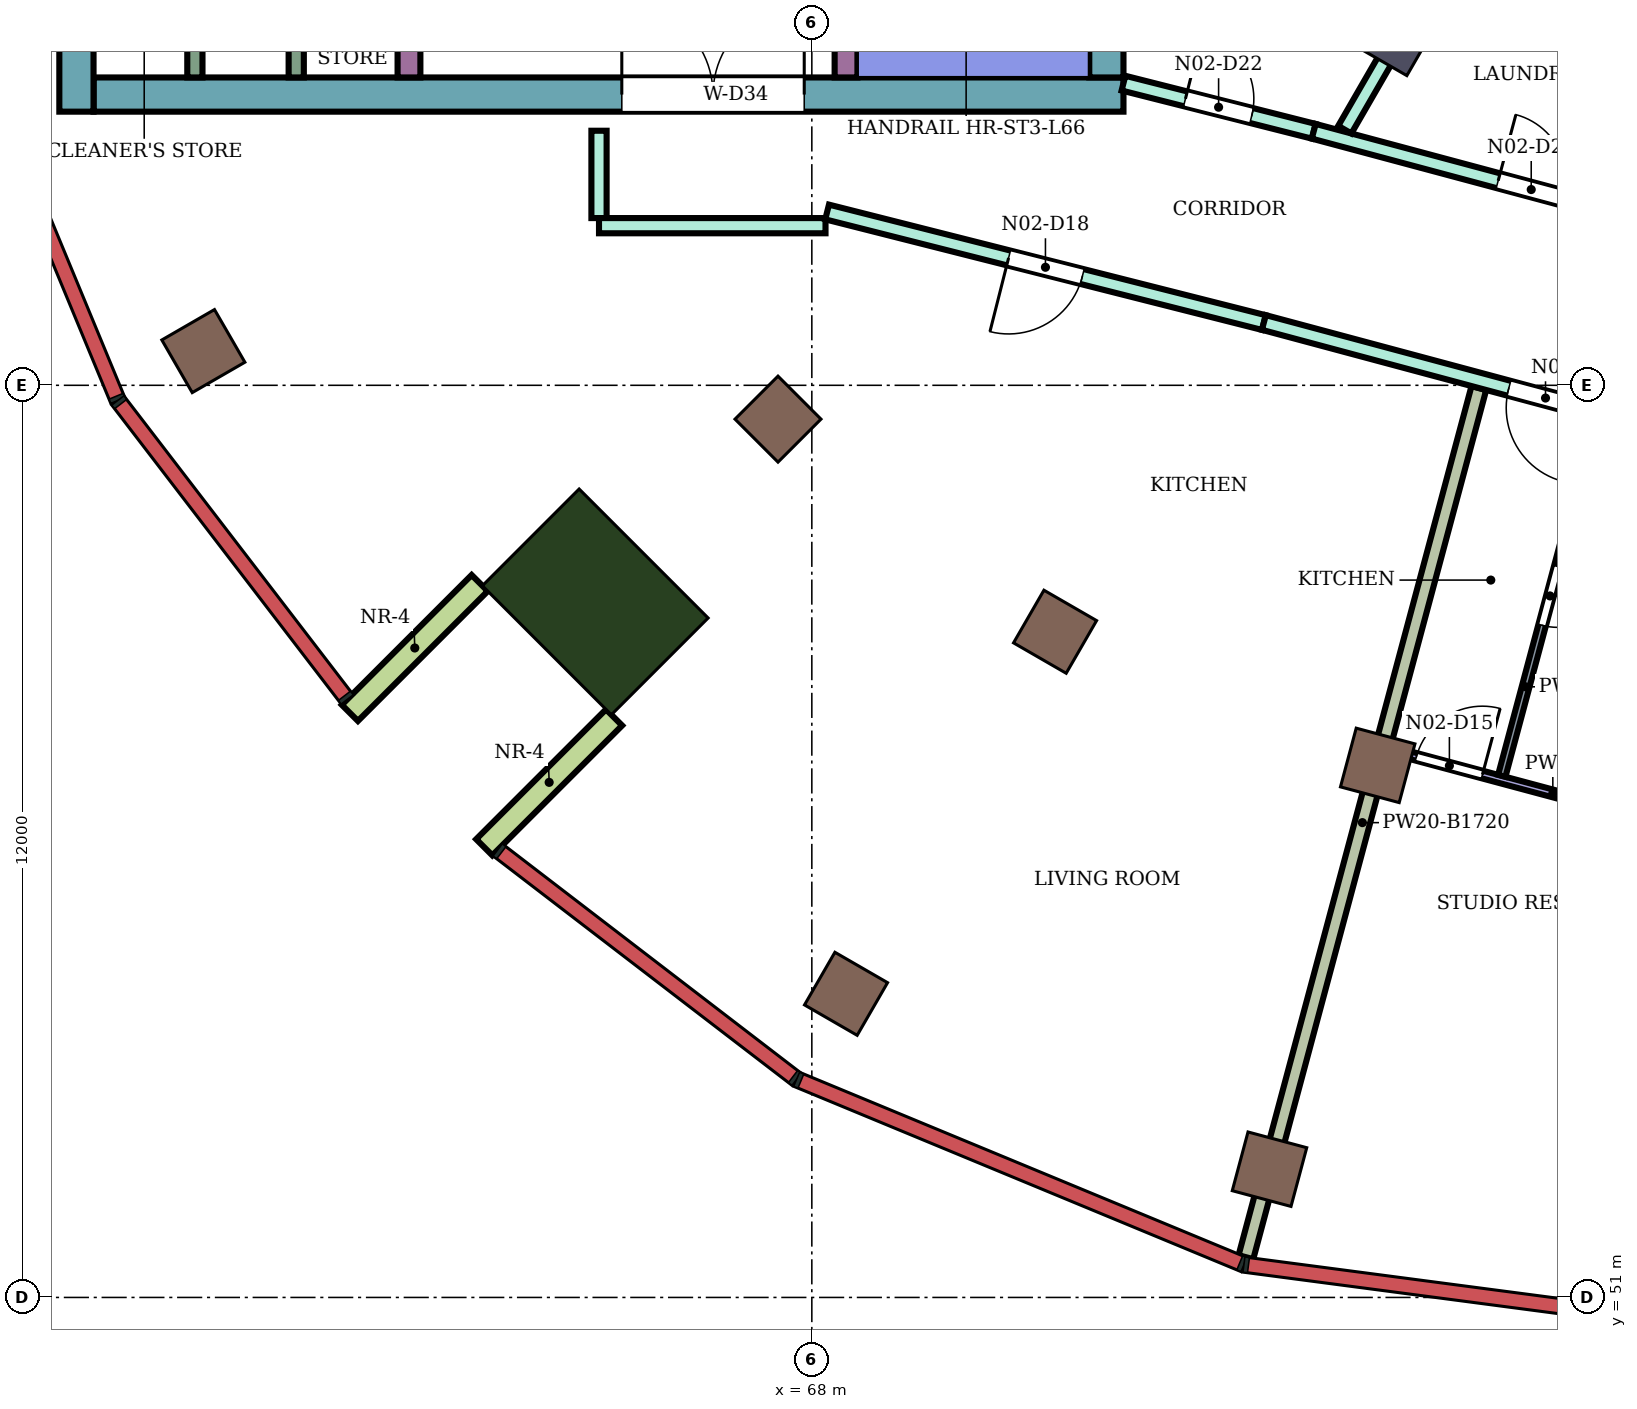
"""IFC4 building model, lengths in metres.
Left out: names, types, materials, properties, quantities, classifications, styles, units other than length and angle.
Written with IfcOpenShell. Run it as: python <this file> out.ifc"""

import sys

from ifc_helpers import new_model, si_unit, direction, frame, frame_2d, origin, origin_2d, place, context, subcontext, project, spatial, rectangle, extrude, element, fill, save


model = new_model("IFC4")
c1 = context("Model", 3, precision=1e-05, world=origin(), true_north=direction((0.0, 1.0)))
c2 = subcontext(c1, "Body", "Model", "MODEL_VIEW")
j1 = project(units=[si_unit("LENGTHUNIT", "METRE"), si_unit("PLANEANGLEUNIT", "RADIAN")], contexts=[c1])
p1 = place(None, origin())
s1 = spatial("IfcSite", under=j1, at=p1, CompositionType="ELEMENT")
p2 = place(p1, origin())
s2 = spatial("IfcBuilding", under=s1, at=p2, CompositionType="ELEMENT")
p3 = place(p2, frame((0.0, 0.0, 288.3)))
s3 = spatial("IfcBuildingStorey", under=s2, at=p3, CompositionType="ELEMENT", Elevation=288.3)
for number, where, z_axis, x_axis in (
    (1, (59.995, 63.45, 0.0), (0.0, 0.0, 1.0), (-0.866, -0.5, 0.0)),
    (2, (68.45, 54.995, 0.0), (0.0, 0.0, 1.0), (-0.5, -0.866, 0.0)),
    (3, (74.021, 52.687, 0.0), (0.0, 0.0, 1.0), (-0.259, -0.966, 0.0)),
    (4, (67.555, 62.555, 0.0), (0.0, 0.0, 1.0), (-0.707, -0.707, 0.0)),
    (5, (71.2, 59.758, 0.0), (0.0, 0.0, 1.0), (-0.5, -0.866, 0.0)),
    (6, (75.445, 58.0, 0.0), (0.0, 0.0, 1.0), (-0.259, -0.966, 0.0)),
):
    element("IfcColumn", number, at=place(p3, frame(where, z_axis=z_axis, x_axis=x_axis)), inside=s3, PredefinedType="COLUMN", context=c2, shape_type="SweptSolid", body=[
        extrude(rectangle(XDim=0.8, YDim=0.8, at=origin_2d()), origin(), (0.0, 0.0, 1.0), 4.2),
    ])
p4 = place(p3, frame((75.7, 67.552, 0.0), z_axis=(0.0, 0.0, 1.0), x_axis=(-0.5, -0.866025403784, 0.0)))
e7 = element("IfcColumn", 7, at=p4, inside=s3, PredefinedType="COLUMN", context=c2, shape_type="SweptSolid", body=[
    extrude(rectangle(XDim=0.7, YDim=0.7, at=origin_2d()), origin(), (0.0, 0.0, 1.0), 4.2),
])
p5 = place(p3, frame((65.151, 60.151, 0.0), z_axis=(0.0, 0.0, 1.0), x_axis=(-0.707106781187, -0.707106781187, 0.0)))
e8 = element("IfcColumn", 8, at=p5, inside=s3, PredefinedType="COLUMN", context=c2, shape_type="SweptSolid", body=[
    extrude(rectangle(XDim=1.8, YDim=2.4, at=origin_2d()), origin(), (0.0, 0.0, 1.0), 4.2),
])
p6 = place(p3, frame((72.1, 66.825, 0.0), z_axis=(0.0, 0.0, 1.0), x_axis=(-1.0, 0.0, 0.0)))
e9 = element("IfcWall", 9, at=p6, inside=s3, PredefinedType="SHEAR", context=c2, shape_type="SweptSolid", body=[
    extrude(rectangle(XDim=13.55, YDim=0.45, at=frame_2d((6.775, 0.0))), origin(), (0.0, 0.0, 1.0), 3.88),
])
p7 = place(p6, frame((4.2, 0.0, 0.0)))
e10 = element("IfcOpeningElement", 10, at=p7, cuts=e9, PredefinedType="OPENING", context=c2, shape_type="SweptSolid", body=[
    extrude(rectangle(XDim=2.4, YDim=2.4, at=frame_2d((1.2, 1.2))), frame((0.0, 0.235, 0.0), z_axis=(0.0, -1.0, 0.0), x_axis=(1.0, 0.0, 0.0)), (0.0, 0.0, 1.0), 0.47),
])
p8 = place(p3, frame((71.875, 75.0, 0.0), z_axis=(0.0, 0.0, 1.0), x_axis=(0.0, -1.0, 0.0)))
e11 = element("IfcWall", 11, at=p8, inside=s3, PredefinedType="SHEAR", context=c2, shape_type="SweptSolid", body=[
    extrude(rectangle(XDim=7.95, YDim=0.45, at=frame_2d((3.975, 0.0))), origin(), (0.0, 0.0, 1.0), 3.88),
])
p9 = place(p3, frame((58.325, 83.4, 0.0), z_axis=(0.0, 0.0, 1.0), x_axis=(0.0, -1.0, 0.0)))
e12 = element("IfcWall", 12, at=p9, inside=s3, PredefinedType="SHEAR", context=c2, shape_type="SweptSolid", body=[
    extrude(rectangle(XDim=16.8, YDim=0.45, at=frame_2d((8.4, 0.0))), origin(), (0.0, 0.0, 1.0), 3.88),
])
p10 = place(p3, frame((68.45, 75.0, 0.0), z_axis=(0.0, 0.0, 1.0), x_axis=(0.0, -1.0, 0.0)))
e13 = element("IfcWall", 13, at=p10, inside=s3, PredefinedType="SHEAR", context=c2, shape_type="SweptSolid", body=[
    extrude(rectangle(XDim=7.95, YDim=0.3, at=frame_2d((3.975, 0.0))), origin(), (0.0, 0.0, 1.0), 3.88),
])
p11 = place(p10, frame((1.85, 0.0, 0.0)))
e14 = element("IfcOpeningElement", 14, at=p11, cuts=e13, PredefinedType="OPENING", context=c2, shape_type="SweptSolid", body=[
    extrude(rectangle(XDim=0.9, YDim=2.1, at=frame_2d((0.45, 1.05))), frame((0.0, 0.16, 0.0), z_axis=(0.0, -1.0, 0.0), x_axis=(1.0, 0.0, 0.0)), (0.0, 0.0, 1.0), 0.32),
])
p12 = place(p3, frame((62.7, 70.45, 0.0), z_axis=(0.0, 0.0, 1.0), x_axis=(0.0, -1.0, 0.0)))
e15 = element("IfcWall", 15, at=p12, inside=s3, PredefinedType="SHEAR", context=c2, shape_type="SweptSolid", body=[
    extrude(rectangle(XDim=3.4, YDim=0.3, at=frame_2d((1.7, 0.0))), origin(), (0.0, 0.0, 1.0), 3.88),
])
for number, where, z_axis, x_axis in (
    (16, (63.63, 60.398, 0.0), (0.0, 0.0, 1.0), (-0.707, -0.707, 0.0)),
    (17, (65.398, 58.63, 0.0), (0.0, 0.0, 1.0), (-0.707, -0.707, 0.0)),
):
    element("IfcWall", number, at=place(p3, frame(where, z_axis=z_axis, x_axis=x_axis)), inside=s3, PredefinedType="NOTDEFINED", context=c2, shape_type="SweptSolid", body=[
        extrude(rectangle(XDim=2.416, YDim=0.3, at=frame_2d((1.208, 0.0))), origin(), (0.0, 0.0, 1.0), 4.2),
    ])
p13 = place(p3, frame((76.198, 68.415, 0.0), z_axis=(0.0, 0.0, 1.0), x_axis=(0.965933654434, -0.258789828301, 0.0)))
e18 = element("IfcWall", 18, at=p13, inside=s3, PredefinedType="NOTDEFINED", context=c2, shape_type="SweptSolid", body=[
    extrude(rectangle(XDim=3.936, YDim=0.2, at=frame_2d((1.968, 0.0))), origin(), (0.0, 0.0, 1.0), 4.2),
])
p14 = place(p13, frame((0.468, 0.0, 0.9)))
e19 = element("IfcOpeningElement", 19, at=p14, cuts=e18, PredefinedType="OPENING", context=c2, shape_type="SweptSolid", body=[
    extrude(rectangle(XDim=3.0, YDim=2.3, at=frame_2d((1.5, 1.15))), frame((0.0, 0.11, 0.0), z_axis=(0.0, -1.0, 0.0), x_axis=(1.0, 0.0, 0.0)), (0.0, 0.0, 1.0), 0.22),
])
p15 = place(p3, frame((65.2, 65.2, 0.0), z_axis=(0.0, 0.0, 1.0), x_axis=(0.0, 1.0, 0.0)))
e20 = element("IfcWall", 20, at=p15, inside=s3, PredefinedType="PARTITIONING", context=c2, shape_type="SweptSolid", body=[
    extrude(rectangle(XDim=1.149, YDim=0.2, at=frame_2d((0.575, 0.0))), origin(), (0.0, 0.0, 1.0), 3.75),
])
p16 = place(p3, frame((65.2, 65.1, 0.0), z_axis=(0.0, 0.0, 1.0), x_axis=(1.0, 0.0, 0.0)))
e21 = element("IfcWall", 21, at=p16, inside=s3, PredefinedType="PARTITIONING", context=c2, shape_type="SweptSolid", body=[
    extrude(rectangle(XDim=2.98, YDim=0.2, at=frame_2d((1.49, 0.0))), origin(), (0.0, 0.0, 1.0), 3.75),
])
p17 = place(p3, frame((68.201, 65.28, 0.0), z_axis=(0.0, 0.0, 1.0), x_axis=(0.969421088032, -0.245403247897, 0.0)))
e22 = element("IfcWall", 22, at=p17, inside=s3, PredefinedType="PARTITIONING", context=c2, shape_type="SweptSolid", body=[
    extrude(rectangle(XDim=5.927, YDim=0.2, at=frame_2d((2.964, 0.0))), origin(), (0.0, 0.0, 1.0), 3.75),
])
p18 = place(p17, frame((2.463, 0.0, 0.0)))
e23 = element("IfcOpeningElement", 23, at=p18, cuts=e22, PredefinedType="OPENING", context=c2, shape_type="SweptSolid", body=[
    extrude(rectangle(XDim=1.0, YDim=2.1, at=frame_2d((0.5, 1.05))), frame((0.0, 0.11, 0.0), z_axis=(0.0, -1.0, 0.0), x_axis=(1.0, 0.0, 0.0)), (0.0, 0.0, 1.0), 0.22),
])
p19 = place(p3, frame((72.1, 66.975, 0.0), z_axis=(0.0, 0.0, 1.0), x_axis=(0.969471314457, -0.245204752086, 0.0)))
e24 = element("IfcWall", 24, at=p19, inside=s3, PredefinedType="PARTITIONING", context=c2, shape_type="SweptSolid", body=[
    extrude(rectangle(XDim=2.582, YDim=0.2, at=frame_2d((1.291, 0.0))), origin(), (0.0, 0.0, 1.0), 3.75),
])
p20 = place(p19, frame((0.841, 0.0, 0.0)))
e25 = element("IfcOpeningElement", 25, at=p20, cuts=e24, PredefinedType="OPENING", context=c2, shape_type="SweptSolid", body=[
    extrude(rectangle(XDim=0.9, YDim=2.1, at=frame_2d((0.45, 1.05))), frame((0.0, 0.11, 0.0), z_axis=(0.0, -1.0, 0.0), x_axis=(1.0, 0.0, 0.0)), (0.0, 0.0, 1.0), 0.22),
])
p21 = place(p3, frame((73.711, 51.53, 0.0), z_axis=(0.0, 0.0, 1.0), x_axis=(0.258903780219, 0.965903117599, 0.0)))
e26 = element("IfcWall", 26, at=p21, inside=s3, PredefinedType="PARTITIONING", context=c2, shape_type="SweptSolid", body=[
    extrude(rectangle(XDim=11.837, YDim=0.2, at=frame_2d((5.918, 0.0))), origin(), (0.0, 0.0, 1.0), 2.48),
])
p22 = place(p3, frame((73.947, 63.826, 0.0), z_axis=(0.0, 0.0, 1.0), x_axis=(0.965862619462, -0.259054821082, 0.0)))
e27 = element("IfcWall", 27, at=p22, inside=s3, PredefinedType="PARTITIONING", context=c2, shape_type="SweptSolid", body=[
    extrude(rectangle(XDim=6.177, YDim=0.2, at=frame_2d((3.088, 0.0))), origin(), (0.0, 0.0, 1.0), 3.75),
])
p23 = place(p22, frame((3.336, 0.0, 0.0)))
e28 = element("IfcOpeningElement", 28, at=p23, cuts=e27, PredefinedType="OPENING", context=c2, shape_type="SweptSolid", body=[
    extrude(rectangle(XDim=1.0, YDim=2.1, at=frame_2d((0.5, 1.05))), frame((0.0, 0.11, 0.0), z_axis=(0.0, -1.0, 0.0), x_axis=(1.0, 0.0, 0.0)), (0.0, 0.0, 1.0), 0.22),
])
p24 = place(p3, frame((74.603, 66.342, 0.0), z_axis=(0.0, 0.0, 1.0), x_axis=(0.965920893652, -0.258837453254, 0.0)))
e29 = element("IfcWall", 29, at=p24, inside=s3, PredefinedType="PARTITIONING", context=c2, shape_type="SweptSolid", body=[
    extrude(rectangle(XDim=5.458, YDim=0.2, at=frame_2d((2.729, 0.0))), origin(), (0.0, 0.0, 1.0), 3.75),
])
p25 = place(p24, frame((2.512, 0.0, 0.0)))
e30 = element("IfcOpeningElement", 30, at=p25, cuts=e29, PredefinedType="OPENING", context=c2, shape_type="SweptSolid", body=[
    extrude(rectangle(XDim=0.9, YDim=2.1, at=frame_2d((0.45, 1.05))), frame((0.0, 0.11, 0.0), z_axis=(0.0, -1.0, 0.0), x_axis=(1.0, 0.0, 0.0)), (0.0, 0.0, 1.0), 0.22),
])
p26 = place(p3, frame((75.012, 66.363, 0.0), z_axis=(0.0, 0.0, 1.0), x_axis=(0.500143511652, 0.865942531438, 0.0)))
e31 = element("IfcWall", 31, at=p26, inside=s3, PredefinedType="PARTITIONING", context=c2, shape_type="SweptSolid", body=[
    extrude(rectangle(XDim=2.275, YDim=0.2, at=frame_2d((1.138, 0.0))), origin(), (0.0, 0.0, 1.0), 3.75),
])
p27 = place(p3, frame((75.604, 58.205, 0.0), z_axis=(0.0, 0.0, 1.0), x_axis=(0.96596252401, -0.258682048483, 0.0)))
e32 = element("IfcWall", 32, at=p27, inside=s3, PredefinedType="PARTITIONING", context=c2, shape_type="SweptSolid", body=[
    extrude(rectangle(XDim=4.441, YDim=0.1, at=frame_2d((2.221, 0.0))), origin(), (0.0, 0.0, 1.0), 3.38),
])
p28 = place(p27, frame((0.362, 0.0, 0.0)))
e33 = element("IfcOpeningElement", 33, at=p28, cuts=e32, PredefinedType="OPENING", context=c2, shape_type="SweptSolid", body=[
    extrude(rectangle(XDim=0.9, YDim=2.1, at=frame_2d((0.45, 1.05))), frame((0.0, 0.06, 0.0), z_axis=(0.0, -1.0, 0.0), x_axis=(1.0, 0.0, 0.0)), (0.0, 0.0, 1.0), 0.12),
])
p29 = place(p3, frame((77.077, 57.862, 0.0), z_axis=(0.0, 0.0, 1.0), x_axis=(0.258774664065, 0.96593771706, 0.0)))
e34 = element("IfcWall", 34, at=p29, inside=s3, PredefinedType="PARTITIONING", context=c2, shape_type="SweptSolid", body=[
    extrude(rectangle(XDim=4.85, YDim=0.1, at=frame_2d((2.425, 0.0))), origin(), (0.0, 0.0, 1.0), 3.75),
])
p30 = place(p29, frame((2.05, 0.0, 0.0)))
e35 = element("IfcOpeningElement", 35, at=p30, cuts=e34, PredefinedType="OPENING", context=c2, shape_type="SweptSolid", body=[
    extrude(rectangle(XDim=0.8, YDim=2.1, at=frame_2d((0.4, 1.05))), frame((0.0, 0.06, 0.0), z_axis=(0.0, -1.0, 0.0), x_axis=(1.0, 0.0, 0.0)), (0.0, 0.0, 1.0), 0.12),
])
for number, where, z_axis, x_axis in (
    (36, (61.217, 70.15, 0.0), (0.0, 0.0, 1.0), (0.0, -1.0, 0.0)),
    (37, (59.883, 70.15, 0.0), (0.0, 0.0, 1.0), (0.0, -1.0, 0.0)),
):
    element("IfcWall", number, at=place(p3, frame(where, z_axis=z_axis, x_axis=x_axis)), inside=s3, PredefinedType="PARTITIONING", context=c2, shape_type="SweptSolid", body=[
        extrude(rectangle(XDim=3.1, YDim=0.2, at=frame_2d((1.55, 0.0))), origin(), (0.0, 0.0, 1.0), 3.88),
    ])
p31 = place(p28, origin())
e38 = element("IfcDoor", 38, at=p31, inside=s3, OperationType="SINGLE_SWING_RIGHT", PredefinedType="DOOR", context=c2, shape_type="SweptSolid", body=[
    extrude(rectangle(XDim=0.9, YDim=2.1, at=frame_2d((0.45, 1.05))), frame((0.0, 0.025, 0.0), z_axis=(0.0, -1.0, 0.0), x_axis=(1.0, 0.0, 0.0)), (0.0, 0.0, 1.0), 0.05),
])
fill(e33, e38)
p32 = place(p23, frame((1.0, 0.0, 0.0), z_axis=(0.0, 0.0, 1.0), x_axis=(-1.0, 0.0, 0.0)))
e39 = element("IfcDoor", 39, at=p32, inside=s3, OperationType="SINGLE_SWING_LEFT", PredefinedType="DOOR", context=c2, shape_type="SweptSolid", body=[
    extrude(rectangle(XDim=1.0, YDim=2.1, at=frame_2d((0.5, 1.05))), frame((0.0, 0.025, 0.0), z_axis=(0.0, -1.0, 0.0), x_axis=(1.0, 0.0, 0.0)), (0.0, 0.0, 1.0), 0.05),
])
fill(e28, e39)
p33 = place(p30, frame((0.8, 0.0, 0.0), z_axis=(0.0, 0.0, 1.0), x_axis=(-1.0, 0.0, 0.0)))
e40 = element("IfcDoor", 40, at=p33, inside=s3, OperationType="SINGLE_SWING_LEFT", PredefinedType="DOOR", context=c2, shape_type="SweptSolid", body=[
    extrude(rectangle(XDim=0.8, YDim=2.1, at=frame_2d((0.4, 1.05))), frame((0.0, 0.025, 0.0), z_axis=(0.0, -1.0, 0.0), x_axis=(1.0, 0.0, 0.0)), (0.0, 0.0, 1.0), 0.05),
])
fill(e35, e40)
p34 = place(p18, frame((1.0, 0.0, 0.0), z_axis=(0.0, 0.0, 1.0), x_axis=(-1.0, 0.0, 0.0)))
e41 = element("IfcDoor", 41, at=p34, inside=s3, OperationType="SINGLE_SWING_RIGHT", PredefinedType="DOOR", context=c2, shape_type="SweptSolid", body=[
    extrude(rectangle(XDim=1.0, YDim=2.1, at=frame_2d((0.5, 1.05))), frame((0.0, 0.025, 0.0), z_axis=(0.0, -1.0, 0.0), x_axis=(1.0, 0.0, 0.0)), (0.0, 0.0, 1.0), 0.05),
])
fill(e23, e41)
p35 = place(p25, origin())
e42 = element("IfcDoor", 42, at=p35, inside=s3, OperationType="SINGLE_SWING_LEFT", PredefinedType="DOOR", context=c2, shape_type="SweptSolid", body=[
    extrude(rectangle(XDim=0.9, YDim=2.1, at=frame_2d((0.45, 1.05))), frame((0.0, 0.025, 0.0), z_axis=(0.0, -1.0, 0.0), x_axis=(1.0, 0.0, 0.0)), (0.0, 0.0, 1.0), 0.05),
])
fill(e30, e42)
p36 = place(p20, origin())
e43 = element("IfcDoor", 43, at=p36, inside=s3, OperationType="SINGLE_SWING_LEFT", PredefinedType="DOOR", context=c2, shape_type="SweptSolid", body=[
    extrude(rectangle(XDim=0.9, YDim=2.1, at=frame_2d((0.45, 1.05))), frame((0.0, 0.025, 0.0), z_axis=(0.0, -1.0, 0.0), x_axis=(1.0, 0.0, 0.0)), (0.0, 0.0, 1.0), 0.05),
])
fill(e25, e43)
p37 = place(p7, frame((2.4, 0.0, 0.0), z_axis=(0.0, 0.0, 1.0), x_axis=(-1.0, 0.0, 0.0)))
e44 = element("IfcDoor", 44, at=p37, inside=s3, OperationType="DOUBLE_DOOR_SINGLE_SWING", PredefinedType="DOOR", context=c2, shape_type="SweptSolid", body=[
    extrude(rectangle(XDim=2.4, YDim=2.4, at=frame_2d((1.2, 1.2))), frame((0.0, 0.025, 0.0), z_axis=(0.0, -1.0, 0.0), x_axis=(1.0, 0.0, 0.0)), (0.0, 0.0, 1.0), 0.05),
])
fill(e10, e44)
save(model, sys.argv[1])
